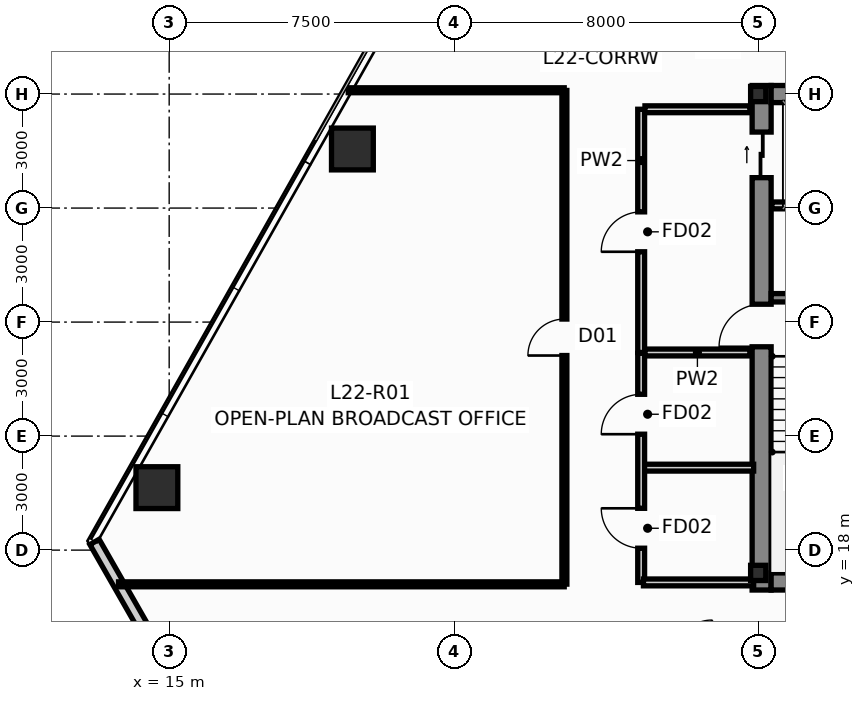
"""IFC4 building model, lengths in metres.
Left out: names, types, materials, properties, quantities, classifications, styles, units other than length and angle.
Written with IfcOpenShell. Run it as: python <this file> out.ifc"""

import sys

from ifc_helpers import new_model, si_unit, direction, frame, frame_2d, origin, origin_2d, place, context, subcontext, project, spatial, rectangle, hollow_rectangle, i_section, extrude, source, transform, mapped, element, fill, save


model = new_model("IFC4")
c1 = context("Model", 3, precision=1e-05, world=origin(), true_north=direction((0.0, 1.0)))
c2 = subcontext(c1, "Body", "Model", "MODEL_VIEW")
j1 = project(units=[si_unit("LENGTHUNIT", "METRE"), si_unit("PLANEANGLEUNIT", "RADIAN")], contexts=[c1])
p1 = place(None, origin())
s1 = spatial("IfcSite", under=j1, at=p1, CompositionType="ELEMENT")
p2 = place(p1, origin())
s2 = spatial("IfcBuilding", under=s1, at=p2, CompositionType="ELEMENT")
p3 = place(p2, frame((0.0, 0.0, 87.15)))
s3 = spatial("IfcBuildingStorey", under=s2, at=p3, CompositionType="ELEMENT", Elevation=87.15)
m1 = source(origin(), c2, "Body", "SweptSolid", [
    extrude(i_section(OverallWidth=0.4, OverallDepth=0.4, WebThickness=0.02, FlangeThickness=0.032, at=origin_2d()), origin(), (0.0, 0.0, 1.0), 3.65),
])
for number, where, z_axis, x_axis in (
    (1, (30.5, 17.4, 0.0), (0.0, 0.0, 1.0), (1.0, 0.0, 0.0)),
    (2, (30.5, 30.0, 0.0), (0.0, 0.0, 1.0), (1.0, 0.0, 0.0)),
):
    element("IfcColumn", number, at=place(p3, frame(where, z_axis=z_axis, x_axis=x_axis)), inside=s3, PredefinedType="COLUMN", context=c2, shape_type="MappedRepresentation", body=[
        mapped(m1, transform((0.0, 0.0, 0.0), scale=1.0)),
    ])
p4 = place(p3, frame((30.59, 16.95, 0.0), z_axis=(0.0, 0.0, 1.0), x_axis=(0.0, 1.0, 0.0)))
e3 = element("IfcWall", 3, at=p4, inside=s3, PredefinedType="SHEAR", context=c2, shape_type="SweptSolid", body=[
    extrude(rectangle(XDim=13.275, YDim=0.5, at=frame_2d((6.638, 0.0))), origin(), (0.0, 0.0, 1.0), 3.65),
])
p5 = place(p4, frame((6.4, 0.0, 0.0)))
e4 = element("IfcOpeningElement", 4, at=p5, cuts=e3, PredefinedType="OPENING", context=c2, shape_type="SweptSolid", body=[
    extrude(rectangle(XDim=1.12, YDim=2.15, at=frame_2d((0.56, 1.075))), frame((0.0, 0.262, 0.0), z_axis=(0.0, -1.0, 0.0), x_axis=(1.0, 0.0, 0.0)), (0.0, 0.0, 1.0), 0.524),
])
p6 = place(p4, frame((10.85, 0.0, 0.0)))
e5 = element("IfcOpeningElement", 5, at=p6, cuts=e3, PredefinedType="OPENING", context=c2, shape_type="SweptSolid", body=[
    extrude(rectangle(XDim=1.2, YDim=2.2, at=frame_2d((0.6, 1.1))), frame((0.0, 0.262, 0.0), z_axis=(0.0, -1.0, 0.0), x_axis=(1.0, 0.0, 0.0)), (0.0, 0.0, 1.0), 0.524),
])
for number, where, z_axis, x_axis in (
    (6, (30.84, 17.175, 0.0), (0.0, 0.0, 1.0), (1.0, 0.0, 0.0)),
    (7, (30.84, 30.0, 0.0), (0.0, 0.0, 1.0), (1.0, 0.0, 0.0)),
):
    element("IfcWall", number, at=place(p3, frame(where, z_axis=z_axis, x_axis=x_axis)), inside=s3, PredefinedType="SHEAR", context=c2, shape_type="SweptSolid", body=[
        extrude(rectangle(XDim=2.9, YDim=0.45, at=frame_2d((1.45, 0.0))), origin(), (0.0, 0.0, 1.0), 3.65),
    ])
p7 = place(p3, frame((30.84, 24.64, 0.0), z_axis=(0.0, 0.0, 1.0), x_axis=(1.0, 0.0, 0.0)))
e8 = element("IfcWall", 8, at=p7, inside=s3, PredefinedType="SHEAR", context=c2, shape_type="SweptSolid", body=[
    extrude(rectangle(XDim=2.9, YDim=0.22, at=frame_2d((1.45, 0.0))), origin(), (0.0, 0.0, 1.0), 3.65),
])
m2 = source(origin(), c2, "Body", "SweptSolid", [
    extrude(hollow_rectangle(XDim=1.1, YDim=1.1, WallThickness=0.06, at=origin_2d()), origin(), (0.0, 0.0, 1.0), 3.651),
])
p8 = place(p3, frame((19.821, 28.555, 0.0), z_axis=(0.014912316331, -0.013775502979, 0.999793907933), x_axis=(0.678553674548, 0.734550822447, 0.0)))
e9 = element("IfcColumn", 9, at=p8, inside=s3, PredefinedType="COLUMN", context=c2, shape_type="MappedRepresentation", body=[
    mapped(m2, transform((0.0, 0.0, 0.0), scale=1.0)),
])
m3 = source(origin(), c2, "Body", "SweptSolid", [
    extrude(hollow_rectangle(XDim=1.1, YDim=1.1, WallThickness=0.06, at=origin_2d()), origin(), (0.0, 0.0, 1.0), 3.651),
])
p9 = place(p3, frame((14.677, 19.644, 0.0), z_axis=(0.010431083049, -0.021597691184, 0.999712324742), x_axis=(0.900476348161, 0.434904985489, 0.0)))
e10 = element("IfcColumn", 10, at=p9, inside=s3, PredefinedType="COLUMN", context=c2, shape_type="MappedRepresentation", body=[
    mapped(m3, transform((0.0, 0.0, 0.0), scale=1.0)),
])
p10 = place(p3, frame((20.405, 5.333, 0.0), z_axis=(0.0, 0.0, 1.0), x_axis=(-0.496542808459, 0.868012234573, 0.0)))
e11 = element("IfcWall", 11, at=p10, inside=s3, PredefinedType="STANDARD", context=c2, shape_type="SweptSolid", body=[
    extrude(rectangle(XDim=14.841, YDim=0.28, at=frame_2d((7.42, 0.0))), origin(), (0.0, 0.0, 1.0), 3.4),
])
p11 = place(p10, frame((5.17, 0.0, 0.9)))
e12 = element("IfcOpeningElement", 12, at=p11, cuts=e11, PredefinedType="OPENING", context=c2, shape_type="SweptSolid", body=[
    extrude(rectangle(XDim=1.8, YDim=1.8, at=frame_2d((0.9, 0.9))), frame((0.0, 0.152, 0.0), z_axis=(0.0, -1.0, 0.0), x_axis=(1.0, 0.0, 0.0)), (0.0, 0.0, 1.0), 0.304),
])
p12 = place(p3, frame((27.42, 23.2, 0.0), z_axis=(0.0, 0.0, 1.0), x_axis=(0.0, 1.0, 0.0)))
e13 = element("IfcWall", 13, at=p12, inside=s3, PredefinedType="PARTITIONING", context=c2, shape_type="SweptSolid", body=[
    extrude(rectangle(XDim=6.4, YDim=0.18, at=frame_2d((3.2, 0.0))), origin(), (0.0, 0.0, 1.0), 3.027),
])
p13 = place(p12, frame((2.65, 0.0, 0.0)))
e14 = element("IfcOpeningElement", 14, at=p13, cuts=e13, PredefinedType="OPENING", context=c2, shape_type="SweptSolid", body=[
    extrude(rectangle(XDim=1.05, YDim=2.15, at=frame_2d((0.525, 1.075))), frame((0.0, 0.102, 0.0), z_axis=(0.0, -1.0, 0.0), x_axis=(1.0, 0.0, 0.0)), (0.0, 0.0, 1.0), 0.204),
])
p14 = place(p3, frame((27.52, 23.2, 0.0), z_axis=(0.0, 0.0, 1.0), x_axis=(1.0, 0.0, 0.0)))
e15 = element("IfcWall", 15, at=p14, inside=s3, PredefinedType="PARTITIONING", context=c2, shape_type="SweptSolid", body=[
    extrude(rectangle(XDim=2.76, YDim=0.18, at=frame_2d((1.38, 0.0))), origin(), (0.0, 0.0, 1.0), 3.4),
])
p15 = place(p3, frame((27.52, 29.6, 0.0), z_axis=(0.0, 0.0, 1.0), x_axis=(1.0, 0.0, 0.0)))
e16 = element("IfcWall", 16, at=p15, inside=s3, PredefinedType="PARTITIONING", context=c2, shape_type="SweptSolid", body=[
    extrude(rectangle(XDim=2.76, YDim=0.18, at=frame_2d((1.38, 0.0))), origin(), (0.0, 0.0, 1.0), 2.783),
])
for number, where, z_axis, x_axis in (
    (17, (30.86, 27.07, 0.0), (0.0, 0.0, 1.0), (1.0, 0.0, 0.0)),
    (18, (27.48, 20.17, 0.0), (0.0, 0.0, 1.0), (1.0, 0.0, 0.0)),
):
    element("IfcWall", number, at=place(p3, frame(where, z_axis=z_axis, x_axis=x_axis)), inside=s3, PredefinedType="PARTITIONING", context=c2, shape_type="SweptSolid", body=[
        extrude(rectangle(XDim=2.9, YDim=0.18, at=frame_2d((1.45, 0.0))), origin(), (0.0, 0.0, 1.0), 3.4),
    ])
p16 = place(p3, frame((27.42, 17.15, 0.0), z_axis=(0.0, 0.0, 1.0), x_axis=(0.0, 1.0, 0.0)))
e19 = element("IfcWall", 19, at=p16, inside=s3, PredefinedType="PARTITIONING", context=c2, shape_type="SweptSolid", body=[
    extrude(rectangle(XDim=6.03, YDim=0.18, at=frame_2d((3.015, 0.0))), origin(), (0.0, 0.0, 1.0), 3.027),
])
p17 = place(p16, frame((0.9, 0.0, 0.0)))
e20 = element("IfcOpeningElement", 20, at=p17, cuts=e19, PredefinedType="OPENING", context=c2, shape_type="SweptSolid", body=[
    extrude(rectangle(XDim=1.05, YDim=2.15, at=frame_2d((0.525, 1.075))), frame((0.0, 0.102, 0.0), z_axis=(0.0, -1.0, 0.0), x_axis=(1.0, 0.0, 0.0)), (0.0, 0.0, 1.0), 0.204),
])
p18 = place(p16, frame((3.9, 0.0, 0.0)))
e21 = element("IfcOpeningElement", 21, at=p18, cuts=e19, PredefinedType="OPENING", context=c2, shape_type="SweptSolid", body=[
    extrude(rectangle(XDim=1.05, YDim=2.15, at=frame_2d((0.525, 1.075))), frame((0.0, 0.102, 0.0), z_axis=(0.0, -1.0, 0.0), x_axis=(1.0, 0.0, 0.0)), (0.0, 0.0, 1.0), 0.204),
])
p19 = place(p3, frame((27.48, 17.15, 0.0), z_axis=(0.0, 0.0, 1.0), x_axis=(1.0, 0.0, 0.0)))
e22 = element("IfcWall", 22, at=p19, inside=s3, PredefinedType="PARTITIONING", context=c2, shape_type="SweptSolid", body=[
    extrude(rectangle(XDim=2.9, YDim=0.18, at=frame_2d((1.45, 0.0))), origin(), (0.0, 0.0, 1.0), 2.783),
])
p20 = place(p3, frame((25.4, 17.105, 0.0), z_axis=(0.0, 0.0, 1.0), x_axis=(0.0, 1.0, 0.0)))
e23 = element("IfcWall", 23, at=p20, inside=s3, PredefinedType="PARTITIONING", context=c2, shape_type="SweptSolid", body=[
    extrude(rectangle(XDim=12.99, YDim=0.13, at=frame_2d((6.495, 0.0))), origin(), (0.0, 0.0, 1.0), 3.027),
])
p21 = place(p20, frame((6.015, 0.0, 0.0)))
e24 = element("IfcOpeningElement", 24, at=p21, cuts=e23, PredefinedType="OPENING", context=c2, shape_type="SweptSolid", body=[
    extrude(rectangle(XDim=0.96, YDim=2.15, at=frame_2d((0.48, 1.075))), frame((0.0, 0.077, 0.0), z_axis=(0.0, -1.0, 0.0), x_axis=(1.0, 0.0, 0.0)), (0.0, 0.0, 1.0), 0.154),
])
p22 = place(p3, frame((13.668, 17.1, 0.0), z_axis=(0.0, 0.0, 1.0), x_axis=(1.0, 0.0, 0.0)))
e25 = element("IfcWall", 25, at=p22, inside=s3, PredefinedType="PARTITIONING", context=c2, shape_type="SweptSolid", body=[
    extrude(rectangle(XDim=11.727, YDim=0.13, at=frame_2d((5.864, 0.0))), origin(), (0.0, 0.0, 1.0), 3.4),
])
p23 = place(p3, frame((25.395, 30.1, 0.0), z_axis=(0.0, 0.0, 1.0), x_axis=(-1.0, 0.0, 0.0)))
e26 = element("IfcWall", 26, at=p23, inside=s3, PredefinedType="PARTITIONING", context=c2, shape_type="SweptSolid", body=[
    extrude(rectangle(XDim=5.682, YDim=0.13, at=frame_2d((2.841, 0.0))), origin(), (0.0, 0.0, 1.0), 3.4),
])
p24 = place(p5, origin())
e27 = element("IfcDoor", 27, at=p24, inside=s3, OperationType="SINGLE_SWING_LEFT", PredefinedType="DOOR", context=c2, shape_type="SweptSolid", body=[
    extrude(rectangle(XDim=1.12, YDim=2.15, at=frame_2d((0.56, 1.075))), frame((0.0, 0.025, 0.0), z_axis=(0.0, -1.0, 0.0), x_axis=(1.0, 0.0, 0.0)), (0.0, 0.0, 1.0), 0.05),
])
fill(e4, e27)
p25 = place(p6, origin())
e28 = element("IfcDoor", 28, at=p25, inside=s3, OperationType="SLIDING_TO_LEFT", PredefinedType="DOOR", context=c2, shape_type="SweptSolid", body=[
    extrude(rectangle(XDim=1.2, YDim=2.2, at=frame_2d((0.6, 1.1))), frame((0.0, 0.025, 0.0), z_axis=(0.0, -1.0, 0.0), x_axis=(1.0, 0.0, 0.0)), (0.0, 0.0, 1.0), 0.05),
])
fill(e5, e28)
p26 = place(p13, origin())
e29 = element("IfcDoor", 29, at=p26, inside=s3, OperationType="SINGLE_SWING_LEFT", PredefinedType="DOOR", context=c2, shape_type="SweptSolid", body=[
    extrude(rectangle(XDim=1.05, YDim=2.15, at=frame_2d((0.525, 1.075))), frame((0.0, 0.025, 0.0), z_axis=(0.0, -1.0, 0.0), x_axis=(1.0, 0.0, 0.0)), (0.0, 0.0, 1.0), 0.05),
])
fill(e14, e29)
p27 = place(p17, origin())
e30 = element("IfcDoor", 30, at=p27, inside=s3, OperationType="SINGLE_SWING_RIGHT", PredefinedType="DOOR", context=c2, shape_type="SweptSolid", body=[
    extrude(rectangle(XDim=1.05, YDim=2.15, at=frame_2d((0.525, 1.075))), frame((0.0, 0.025, 0.0), z_axis=(0.0, -1.0, 0.0), x_axis=(1.0, 0.0, 0.0)), (0.0, 0.0, 1.0), 0.05),
])
fill(e20, e30)
p28 = place(p18, origin())
e31 = element("IfcDoor", 31, at=p28, inside=s3, OperationType="SINGLE_SWING_LEFT", PredefinedType="DOOR", context=c2, shape_type="SweptSolid", body=[
    extrude(rectangle(XDim=1.05, YDim=2.15, at=frame_2d((0.525, 1.075))), frame((0.0, 0.025, 0.0), z_axis=(0.0, -1.0, 0.0), x_axis=(1.0, 0.0, 0.0)), (0.0, 0.0, 1.0), 0.05),
])
fill(e21, e31)
p29 = place(p21, origin())
e32 = element("IfcDoor", 32, at=p29, inside=s3, OperationType="SINGLE_SWING_LEFT", PredefinedType="DOOR", context=c2, shape_type="SweptSolid", body=[
    extrude(rectangle(XDim=0.96, YDim=2.15, at=frame_2d((0.48, 1.075))), frame((0.0, 0.025, 0.0), z_axis=(0.0, -1.0, 0.0), x_axis=(1.0, 0.0, 0.0)), (0.0, 0.0, 1.0), 0.05),
])
fill(e24, e32)
save(model, sys.argv[1])
